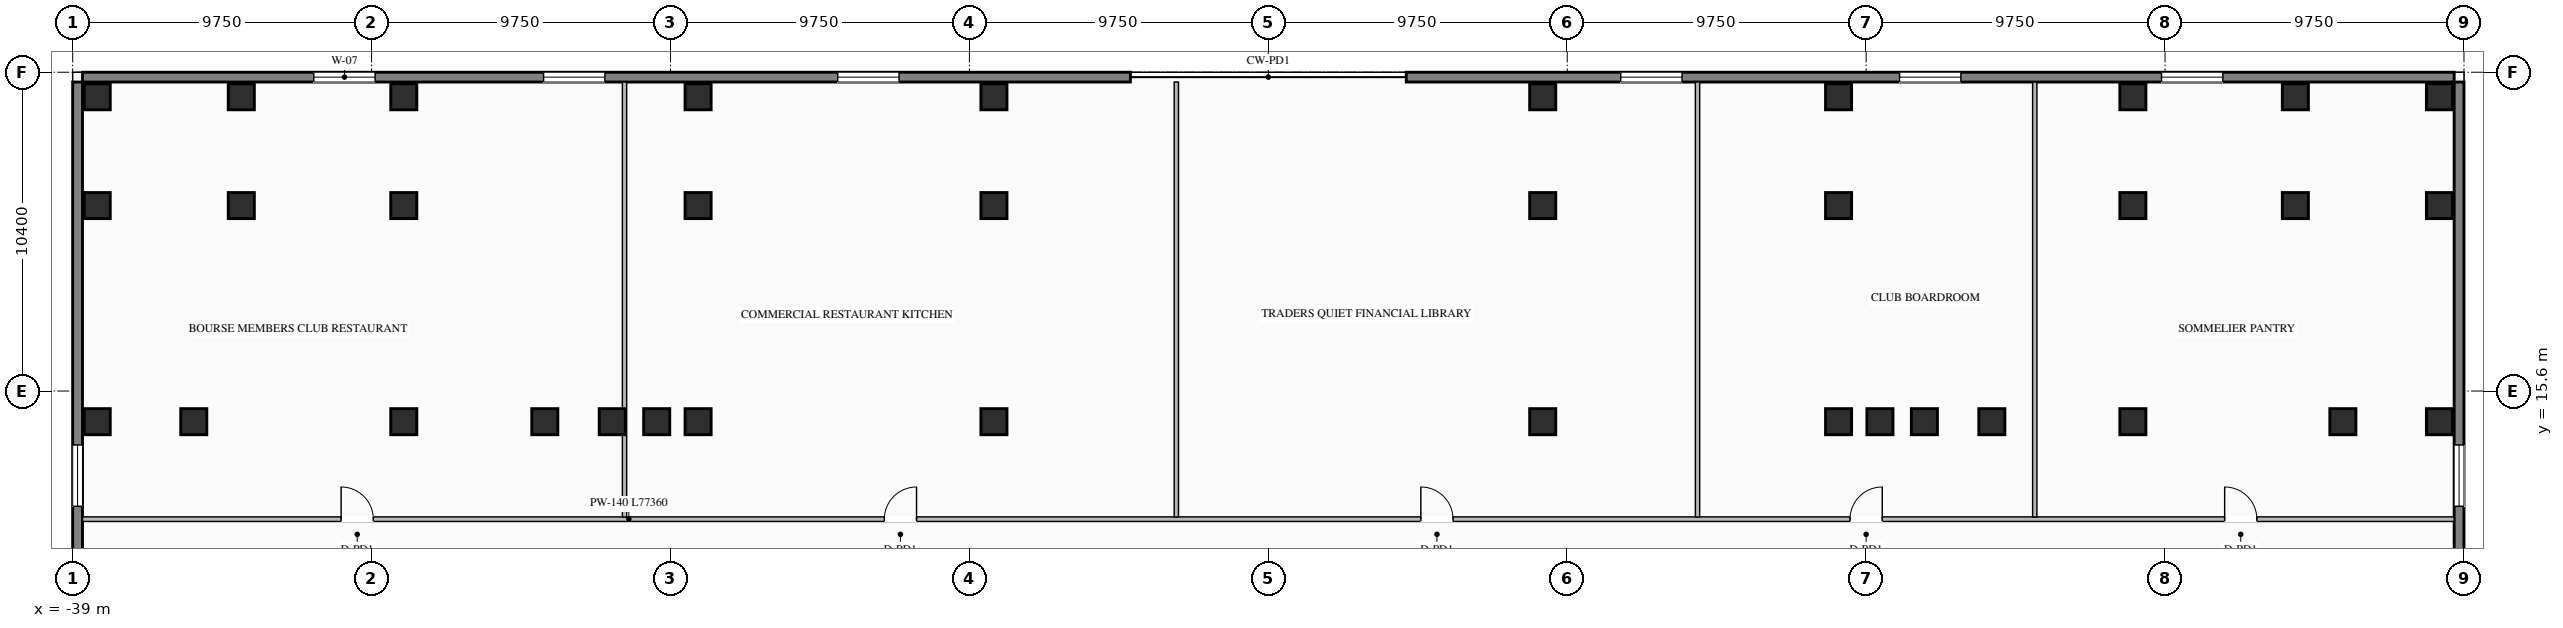
"""IFC4 building model, lengths in metres.
Left out: names, types, materials, properties, quantities, classifications, styles, units other than length and angle.
Written with IfcOpenShell. Run it as: python <this file> out.ifc"""

import sys

from ifc_helpers import new_model, si_unit, direction, frame, frame_2d, origin, origin_2d, place, context, subcontext, project, spatial, rectangle, i_section, extrude, element, fill, save


model = new_model("IFC4")
c1 = context("Model", 3, precision=1e-05, world=origin(), true_north=direction((0.0, 1.0)))
c2 = subcontext(c1, "Body", "Model", "MODEL_VIEW")
j1 = project(units=[si_unit("LENGTHUNIT", "METRE"), si_unit("PLANEANGLEUNIT", "RADIAN")], contexts=[c1])
p1 = place(None, origin())
s1 = spatial("IfcSite", under=j1, at=p1, CompositionType="ELEMENT")
p2 = place(p1, origin())
s2 = spatial("IfcBuilding", under=s1, at=p2, CompositionType="ELEMENT")
p3 = place(p2, frame((0.0, 0.0, 22.8)))
s3 = spatial("IfcBuildingStorey", under=s2, at=p3, CompositionType="ELEMENT", Elevation=22.8)
for number, where, z_axis, x_axis in (
    (1, (-21.4, 14.6, 0.0), (0.0, 0.0, 1.0), (1.0, 0.0, 0.0)),
    (2, (-19.95, 14.6, 0.0), (0.0, 0.0, 1.0), (1.0, 0.0, 0.0)),
    (3, (-18.6, 14.6, 0.0), (0.0, 0.0, 1.0), (1.0, 0.0, 0.0)),
    (4, (-8.95, 14.6, 0.0), (0.0, 0.0, 1.0), (1.0, 0.0, 0.0)),
    (5, (8.95, 14.6, 0.0), (0.0, 0.0, 1.0), (1.0, 0.0, 0.0)),
    (6, (18.6, 14.6, 0.0), (0.0, 0.0, 1.0), (1.0, 0.0, 0.0)),
    (7, (19.95, 14.6, 0.0), (0.0, 0.0, 1.0), (1.0, 0.0, 0.0)),
    (8, (21.4, 14.6, 0.0), (0.0, 0.0, 1.0), (1.0, 0.0, 0.0)),
    (9, (-23.6, 14.6, 0.0), (0.0, 0.0, 1.0), (1.0, 0.0, 0.0)),
    (10, (23.6, 14.6, 0.0), (0.0, 0.0, 1.0), (1.0, 0.0, 0.0)),
    (11, (-28.2, 14.6, 0.0), (0.0, 0.0, 1.0), (1.0, 0.0, 0.0)),
    (12, (28.2, 14.6, 0.0), (0.0, 0.0, 1.0), (1.0, 0.0, 0.0)),
    (13, (-35.05, 14.6, 0.0), (0.0, 0.0, 1.0), (1.0, 0.0, 0.0)),
    (14, (35.05, 14.6, 0.0), (0.0, 0.0, 1.0), (1.0, 0.0, 0.0)),
    (15, (-38.2, 21.65, 0.0), (0.0, 0.0, 1.0), (1.0, 0.0, 0.0)),
    (16, (-33.5, 21.65, 0.0), (0.0, 0.0, 1.0), (1.0, 0.0, 0.0)),
    (17, (-28.2, 21.65, 0.0), (0.0, 0.0, 1.0), (1.0, 0.0, 0.0)),
    (18, (-18.6, 21.65, 0.0), (0.0, 0.0, 1.0), (1.0, 0.0, 0.0)),
    (19, (-8.95, 21.65, 0.0), (0.0, 0.0, 1.0), (1.0, 0.0, 0.0)),
    (20, (8.95, 21.65, 0.0), (0.0, 0.0, 1.0), (1.0, 0.0, 0.0)),
    (21, (18.6, 21.65, 0.0), (0.0, 0.0, 1.0), (1.0, 0.0, 0.0)),
    (22, (28.2, 21.65, 0.0), (0.0, 0.0, 1.0), (1.0, 0.0, 0.0)),
    (23, (33.5, 21.65, 0.0), (0.0, 0.0, 1.0), (1.0, 0.0, 0.0)),
    (24, (38.2, 21.65, 0.0), (0.0, 0.0, 1.0), (1.0, 0.0, 0.0)),
    (25, (-38.2, 25.2, 0.0), (0.0, 0.0, 1.0), (1.0, 0.0, 0.0)),
    (26, (-33.5, 25.2, 0.0), (0.0, 0.0, 1.0), (1.0, 0.0, 0.0)),
    (27, (-28.2, 25.2, 0.0), (0.0, 0.0, 1.0), (1.0, 0.0, 0.0)),
    (28, (-18.6, 25.2, 0.0), (0.0, 0.0, 1.0), (1.0, 0.0, 0.0)),
    (29, (-8.95, 25.2, 0.0), (0.0, 0.0, 1.0), (1.0, 0.0, 0.0)),
    (30, (8.95, 25.2, 0.0), (0.0, 0.0, 1.0), (1.0, 0.0, 0.0)),
    (31, (18.6, 25.2, 0.0), (0.0, 0.0, 1.0), (1.0, 0.0, 0.0)),
    (32, (28.2, 25.2, 0.0), (0.0, 0.0, 1.0), (1.0, 0.0, 0.0)),
    (33, (33.5, 25.2, 0.0), (0.0, 0.0, 1.0), (1.0, 0.0, 0.0)),
    (34, (38.2, 25.2, 0.0), (0.0, 0.0, 1.0), (1.0, 0.0, 0.0)),
    (35, (-38.2, 14.6, 0.0), (0.0, 0.0, 1.0), (1.0, 0.0, 0.0)),
    (36, (38.2, 14.6, 0.0), (0.0, 0.0, 1.0), (1.0, 0.0, 0.0)),
):
    element("IfcColumn", number, at=place(p3, frame(where, z_axis=z_axis, x_axis=x_axis)), inside=s3, PredefinedType="COLUMN", context=c2, shape_type="SweptSolid", body=[
        extrude(i_section(OverallWidth=0.85, OverallDepth=0.85, WebThickness=0.032, FlangeThickness=0.048, at=origin_2d()), origin(), (0.0, 0.0, 1.0), 4.2),
    ])
p4 = place(p3, frame((-38.68, 25.84, 0.0), z_axis=(0.0, 0.0, 1.0), x_axis=(1.0, 0.0, 0.0)))
e37 = element("IfcWall", 37, at=p4, inside=s3, PredefinedType="STANDARD", context=c2, shape_type="SweptSolid", body=[
    extrude(rectangle(XDim=34.18, YDim=0.32, at=frame_2d((17.09, 0.0))), origin(), (0.0, 0.0, 1.0), 3.9),
])
p5 = place(p4, frame((7.545, 0.0, 0.8)))
e38 = element("IfcOpeningElement", 38, at=p5, cuts=e37, PredefinedType="OPENING", context=c2, shape_type="SweptSolid", body=[
    extrude(rectangle(XDim=2.0, YDim=2.2, at=frame_2d((1.0, 1.1))), frame((0.0, 0.17, 0.0), z_axis=(0.0, -1.0, 0.0), x_axis=(1.0, 0.0, 0.0)), (0.0, 0.0, 1.0), 0.34),
])
p6 = place(p4, frame((15.04, 0.0, 0.8)))
e39 = element("IfcOpeningElement", 39, at=p6, cuts=e37, PredefinedType="OPENING", context=c2, shape_type="SweptSolid", body=[
    extrude(rectangle(XDim=2.0, YDim=2.2, at=frame_2d((1.0, 1.1))), frame((0.0, 0.17, 0.0), z_axis=(0.0, -1.0, 0.0), x_axis=(1.0, 0.0, 0.0)), (0.0, 0.0, 1.0), 0.34),
])
p7 = place(p4, frame((24.635, 0.0, 0.8)))
e40 = element("IfcOpeningElement", 40, at=p7, cuts=e37, PredefinedType="OPENING", context=c2, shape_type="SweptSolid", body=[
    extrude(rectangle(XDim=2.0, YDim=2.2, at=frame_2d((1.0, 1.1))), frame((0.0, 0.17, 0.0), z_axis=(0.0, -1.0, 0.0), x_axis=(1.0, 0.0, 0.0)), (0.0, 0.0, 1.0), 0.34),
])
p8 = place(p3, frame((4.5, 25.84, 0.0), z_axis=(0.0, 0.0, 1.0), x_axis=(1.0, 0.0, 0.0)))
e41 = element("IfcWall", 41, at=p8, inside=s3, PredefinedType="STANDARD", context=c2, shape_type="SweptSolid", body=[
    extrude(rectangle(XDim=34.18, YDim=0.32, at=frame_2d((17.09, 0.0))), origin(), (0.0, 0.0, 1.0), 3.9),
])
p9 = place(p8, frame((6.995, 0.0, 0.8)))
e42 = element("IfcOpeningElement", 42, at=p9, cuts=e41, PredefinedType="OPENING", context=c2, shape_type="SweptSolid", body=[
    extrude(rectangle(XDim=2.0, YDim=2.2, at=frame_2d((1.0, 1.1))), frame((0.0, 0.17, 0.0), z_axis=(0.0, -1.0, 0.0), x_axis=(1.0, 0.0, 0.0)), (0.0, 0.0, 1.0), 0.34),
])
p10 = place(p8, frame((16.09, 0.0, 0.8)))
e43 = element("IfcOpeningElement", 43, at=p10, cuts=e41, PredefinedType="OPENING", context=c2, shape_type="SweptSolid", body=[
    extrude(rectangle(XDim=2.0, YDim=2.2, at=frame_2d((1.0, 1.1))), frame((0.0, 0.17, 0.0), z_axis=(0.0, -1.0, 0.0), x_axis=(1.0, 0.0, 0.0)), (0.0, 0.0, 1.0), 0.34),
])
p11 = place(p8, frame((24.635, 0.0, 0.8)))
e44 = element("IfcOpeningElement", 44, at=p11, cuts=e41, PredefinedType="OPENING", context=c2, shape_type="SweptSolid", body=[
    extrude(rectangle(XDim=2.0, YDim=2.2, at=frame_2d((1.0, 1.1))), frame((0.0, 0.17, 0.0), z_axis=(0.0, -1.0, 0.0), x_axis=(1.0, 0.0, 0.0)), (0.0, 0.0, 1.0), 0.34),
])
p12 = place(p3, frame((-38.84, -25.68, 0.0), z_axis=(0.0, 0.0, 1.0), x_axis=(0.0, 1.0, 0.0)))
e45 = element("IfcWall", 45, at=p12, inside=s3, PredefinedType="STANDARD", context=c2, shape_type="SweptSolid", body=[
    extrude(rectangle(XDim=51.36, YDim=0.32, at=frame_2d((25.68, 0.0))), origin(), (0.0, 0.0, 1.0), 3.9),
])
p13 = place(p12, frame((11.84, 0.0, 0.8)))
e46 = element("IfcOpeningElement", 46, at=p13, cuts=e45, PredefinedType="OPENING", context=c2, shape_type="SweptSolid", body=[
    extrude(rectangle(XDim=2.0, YDim=2.2, at=frame_2d((1.0, 1.1))), frame((0.0, 0.17, 0.0), z_axis=(0.0, -1.0, 0.0), x_axis=(1.0, 0.0, 0.0)), (0.0, 0.0, 1.0), 0.34),
])
p14 = place(p12, frame((24.68, 0.0, 0.8)))
e47 = element("IfcOpeningElement", 47, at=p14, cuts=e45, PredefinedType="OPENING", context=c2, shape_type="SweptSolid", body=[
    extrude(rectangle(XDim=2.0, YDim=2.2, at=frame_2d((1.0, 1.1))), frame((0.0, 0.17, 0.0), z_axis=(0.0, -1.0, 0.0), x_axis=(1.0, 0.0, 0.0)), (0.0, 0.0, 1.0), 0.34),
])
p15 = place(p12, frame((37.52, 0.0, 0.8)))
e48 = element("IfcOpeningElement", 48, at=p15, cuts=e45, PredefinedType="OPENING", context=c2, shape_type="SweptSolid", body=[
    extrude(rectangle(XDim=2.0, YDim=2.2, at=frame_2d((1.0, 1.1))), frame((0.0, 0.17, 0.0), z_axis=(0.0, -1.0, 0.0), x_axis=(1.0, 0.0, 0.0)), (0.0, 0.0, 1.0), 0.34),
])
p16 = place(p3, frame((38.84, 25.68, 0.0), z_axis=(0.0, 0.0, 1.0), x_axis=(0.0, -1.0, 0.0)))
e49 = element("IfcWall", 49, at=p16, inside=s3, PredefinedType="STANDARD", context=c2, shape_type="SweptSolid", body=[
    extrude(rectangle(XDim=51.36, YDim=0.32, at=frame_2d((25.68, 0.0))), origin(), (0.0, 0.0, 1.0), 3.9),
])
p17 = place(p16, frame((11.84, 0.0, 0.8)))
e50 = element("IfcOpeningElement", 50, at=p17, cuts=e49, PredefinedType="OPENING", context=c2, shape_type="SweptSolid", body=[
    extrude(rectangle(XDim=2.0, YDim=2.2, at=frame_2d((1.0, 1.1))), frame((0.0, 0.17, 0.0), z_axis=(0.0, -1.0, 0.0), x_axis=(1.0, 0.0, 0.0)), (0.0, 0.0, 1.0), 0.34),
])
p18 = place(p16, frame((24.68, 0.0, 0.8)))
e51 = element("IfcOpeningElement", 51, at=p18, cuts=e49, PredefinedType="OPENING", context=c2, shape_type="SweptSolid", body=[
    extrude(rectangle(XDim=2.0, YDim=2.2, at=frame_2d((1.0, 1.1))), frame((0.0, 0.17, 0.0), z_axis=(0.0, -1.0, 0.0), x_axis=(1.0, 0.0, 0.0)), (0.0, 0.0, 1.0), 0.34),
])
p19 = place(p16, frame((37.52, 0.0, 0.8)))
e52 = element("IfcOpeningElement", 52, at=p19, cuts=e49, PredefinedType="OPENING", context=c2, shape_type="SweptSolid", body=[
    extrude(rectangle(XDim=2.0, YDim=2.2, at=frame_2d((1.0, 1.1))), frame((0.0, 0.17, 0.0), z_axis=(0.0, -1.0, 0.0), x_axis=(1.0, 0.0, 0.0)), (0.0, 0.0, 1.0), 0.34),
])
p20 = place(p3, frame((-38.68, 11.42, 0.0), z_axis=(0.0, 0.0, 1.0), x_axis=(1.0, 0.0, 0.0)))
e53 = element("IfcWall", 53, at=p20, inside=s3, PredefinedType="STANDARD", context=c2, shape_type="SweptSolid", body=[
    extrude(rectangle(XDim=77.36, YDim=0.15, at=frame_2d((38.68, 0.0))), origin(), (0.0, 0.0, 1.0), 3.395),
])
p21 = place(p20, frame((8.436, 0.0, 0.0)))
e54 = element("IfcOpeningElement", 54, at=p21, cuts=e53, PredefinedType="OPENING", context=c2, shape_type="SweptSolid", body=[
    extrude(rectangle(XDim=1.05, YDim=2.08, at=frame_2d((0.525, 1.04))), frame((0.0, 0.085, 0.0), z_axis=(0.0, -1.0, 0.0), x_axis=(1.0, 0.0, 0.0)), (0.0, 0.0, 1.0), 0.17),
])
p22 = place(p20, frame((26.155, 0.0, 0.0)))
e55 = element("IfcOpeningElement", 55, at=p22, cuts=e53, PredefinedType="OPENING", context=c2, shape_type="SweptSolid", body=[
    extrude(rectangle(XDim=1.05, YDim=2.08, at=frame_2d((0.525, 1.04))), frame((0.0, 0.085, 0.0), z_axis=(0.0, -1.0, 0.0), x_axis=(1.0, 0.0, 0.0)), (0.0, 0.0, 1.0), 0.17),
])
p23 = place(p20, frame((43.655, 0.0, 0.0)))
e56 = element("IfcOpeningElement", 56, at=p23, cuts=e53, PredefinedType="OPENING", context=c2, shape_type="SweptSolid", body=[
    extrude(rectangle(XDim=1.05, YDim=2.08, at=frame_2d((0.525, 1.04))), frame((0.0, 0.085, 0.0), z_axis=(0.0, -1.0, 0.0), x_axis=(1.0, 0.0, 0.0)), (0.0, 0.0, 1.0), 0.17),
])
p24 = place(p20, frame((57.655, 0.0, 0.0)))
e57 = element("IfcOpeningElement", 57, at=p24, cuts=e53, PredefinedType="OPENING", context=c2, shape_type="SweptSolid", body=[
    extrude(rectangle(XDim=1.05, YDim=2.08, at=frame_2d((0.525, 1.04))), frame((0.0, 0.085, 0.0), z_axis=(0.0, -1.0, 0.0), x_axis=(1.0, 0.0, 0.0)), (0.0, 0.0, 1.0), 0.17),
])
p25 = place(p20, frame((69.874, 0.0, 0.0)))
e58 = element("IfcOpeningElement", 58, at=p25, cuts=e53, PredefinedType="OPENING", context=c2, shape_type="SweptSolid", body=[
    extrude(rectangle(XDim=1.05, YDim=2.08, at=frame_2d((0.525, 1.04))), frame((0.0, 0.085, 0.0), z_axis=(0.0, -1.0, 0.0), x_axis=(1.0, 0.0, 0.0)), (0.0, 0.0, 1.0), 0.17),
])
for number, where, z_axis, x_axis in (
    (59, (-21.0, 11.49, 0.0), (0.0, 0.0, 1.0), (0.0, 1.0, 0.0)),
    (60, (-3.0, 11.49, 0.0), (0.0, 0.0, 1.0), (0.0, 1.0, 0.0)),
    (61, (14.0, 11.49, 0.0), (0.0, 0.0, 1.0), (0.0, 1.0, 0.0)),
    (62, (25.0, 11.49, 0.0), (0.0, 0.0, 1.0), (0.0, 1.0, 0.0)),
):
    element("IfcWall", number, at=place(p3, frame(where, z_axis=z_axis, x_axis=x_axis)), inside=s3, PredefinedType="STANDARD", context=c2, shape_type="SweptSolid", body=[
        extrude(rectangle(XDim=14.19, YDim=0.14, at=frame_2d((7.095, 0.0))), origin(), (0.0, 0.0, 1.0), 3.9),
    ])
p26 = place(p5, origin())
e63 = element("IfcWindow", 63, at=p26, inside=s3, PartitioningType="DOUBLE_PANEL_VERTICAL", PredefinedType="WINDOW", context=c2, shape_type="SweptSolid", body=[
    extrude(rectangle(XDim=2.0, YDim=2.2, at=frame_2d((1.0, 1.1))), frame((0.0, 0.03, 0.0), z_axis=(0.0, -1.0, 0.0), x_axis=(1.0, 0.0, 0.0)), (0.0, 0.0, 1.0), 0.06),
])
fill(e38, e63)
p27 = place(p6, origin())
e64 = element("IfcWindow", 64, at=p27, inside=s3, PartitioningType="DOUBLE_PANEL_VERTICAL", PredefinedType="WINDOW", context=c2, shape_type="SweptSolid", body=[
    extrude(rectangle(XDim=2.0, YDim=2.2, at=frame_2d((1.0, 1.1))), frame((0.0, 0.03, 0.0), z_axis=(0.0, -1.0, 0.0), x_axis=(1.0, 0.0, 0.0)), (0.0, 0.0, 1.0), 0.06),
])
fill(e39, e64)
p28 = place(p7, origin())
e65 = element("IfcWindow", 65, at=p28, inside=s3, PartitioningType="DOUBLE_PANEL_VERTICAL", PredefinedType="WINDOW", context=c2, shape_type="SweptSolid", body=[
    extrude(rectangle(XDim=2.0, YDim=2.2, at=frame_2d((1.0, 1.1))), frame((0.0, 0.03, 0.0), z_axis=(0.0, -1.0, 0.0), x_axis=(1.0, 0.0, 0.0)), (0.0, 0.0, 1.0), 0.06),
])
fill(e40, e65)
p29 = place(p9, origin())
e66 = element("IfcWindow", 66, at=p29, inside=s3, PartitioningType="DOUBLE_PANEL_VERTICAL", PredefinedType="WINDOW", context=c2, shape_type="SweptSolid", body=[
    extrude(rectangle(XDim=2.0, YDim=2.2, at=frame_2d((1.0, 1.1))), frame((0.0, 0.03, 0.0), z_axis=(0.0, -1.0, 0.0), x_axis=(1.0, 0.0, 0.0)), (0.0, 0.0, 1.0), 0.06),
])
fill(e42, e66)
p30 = place(p10, origin())
e67 = element("IfcWindow", 67, at=p30, inside=s3, PartitioningType="DOUBLE_PANEL_VERTICAL", PredefinedType="WINDOW", context=c2, shape_type="SweptSolid", body=[
    extrude(rectangle(XDim=2.0, YDim=2.2, at=frame_2d((1.0, 1.1))), frame((0.0, 0.03, 0.0), z_axis=(0.0, -1.0, 0.0), x_axis=(1.0, 0.0, 0.0)), (0.0, 0.0, 1.0), 0.06),
])
fill(e43, e67)
p31 = place(p11, origin())
e68 = element("IfcWindow", 68, at=p31, inside=s3, PartitioningType="DOUBLE_PANEL_VERTICAL", PredefinedType="WINDOW", context=c2, shape_type="SweptSolid", body=[
    extrude(rectangle(XDim=2.0, YDim=2.2, at=frame_2d((1.0, 1.1))), frame((0.0, 0.03, 0.0), z_axis=(0.0, -1.0, 0.0), x_axis=(1.0, 0.0, 0.0)), (0.0, 0.0, 1.0), 0.06),
])
fill(e44, e68)
p32 = place(p15, origin())
e69 = element("IfcWindow", 69, at=p32, inside=s3, PartitioningType="DOUBLE_PANEL_VERTICAL", PredefinedType="WINDOW", context=c2, shape_type="SweptSolid", body=[
    extrude(rectangle(XDim=2.0, YDim=2.2, at=frame_2d((1.0, 1.1))), frame((0.0, 0.03, 0.0), z_axis=(0.0, -1.0, 0.0), x_axis=(1.0, 0.0, 0.0)), (0.0, 0.0, 1.0), 0.06),
])
fill(e48, e69)
p33 = place(p17, origin())
e70 = element("IfcWindow", 70, at=p33, inside=s3, PartitioningType="DOUBLE_PANEL_VERTICAL", PredefinedType="WINDOW", context=c2, shape_type="SweptSolid", body=[
    extrude(rectangle(XDim=2.0, YDim=2.2, at=frame_2d((1.0, 1.1))), frame((0.0, 0.03, 0.0), z_axis=(0.0, -1.0, 0.0), x_axis=(1.0, 0.0, 0.0)), (0.0, 0.0, 1.0), 0.06),
])
fill(e50, e70)
p34 = place(p21, origin())
e71 = element("IfcDoor", 71, at=p34, inside=s3, OperationType="SINGLE_SWING_LEFT", PredefinedType="DOOR", context=c2, shape_type="SweptSolid", body=[
    extrude(rectangle(XDim=1.05, YDim=2.08, at=frame_2d((0.525, 1.04))), frame((0.0, 0.025, 0.0), z_axis=(0.0, -1.0, 0.0), x_axis=(1.0, 0.0, 0.0)), (0.0, 0.0, 1.0), 0.05),
])
fill(e54, e71)
p35 = place(p22, origin())
e72 = element("IfcDoor", 72, at=p35, inside=s3, OperationType="SINGLE_SWING_RIGHT", PredefinedType="DOOR", context=c2, shape_type="SweptSolid", body=[
    extrude(rectangle(XDim=1.05, YDim=2.08, at=frame_2d((0.525, 1.04))), frame((0.0, 0.025, 0.0), z_axis=(0.0, -1.0, 0.0), x_axis=(1.0, 0.0, 0.0)), (0.0, 0.0, 1.0), 0.05),
])
fill(e55, e72)
p36 = place(p23, origin())
e73 = element("IfcDoor", 73, at=p36, inside=s3, OperationType="SINGLE_SWING_LEFT", PredefinedType="DOOR", context=c2, shape_type="SweptSolid", body=[
    extrude(rectangle(XDim=1.05, YDim=2.08, at=frame_2d((0.525, 1.04))), frame((0.0, 0.025, 0.0), z_axis=(0.0, -1.0, 0.0), x_axis=(1.0, 0.0, 0.0)), (0.0, 0.0, 1.0), 0.05),
])
fill(e56, e73)
p37 = place(p24, origin())
e74 = element("IfcDoor", 74, at=p37, inside=s3, OperationType="SINGLE_SWING_RIGHT", PredefinedType="DOOR", context=c2, shape_type="SweptSolid", body=[
    extrude(rectangle(XDim=1.05, YDim=2.08, at=frame_2d((0.525, 1.04))), frame((0.0, 0.025, 0.0), z_axis=(0.0, -1.0, 0.0), x_axis=(1.0, 0.0, 0.0)), (0.0, 0.0, 1.0), 0.05),
])
fill(e57, e74)
p38 = place(p25, origin())
e75 = element("IfcDoor", 75, at=p38, inside=s3, OperationType="SINGLE_SWING_LEFT", PredefinedType="DOOR", context=c2, shape_type="SweptSolid", body=[
    extrude(rectangle(XDim=1.05, YDim=2.08, at=frame_2d((0.525, 1.04))), frame((0.0, 0.025, 0.0), z_axis=(0.0, -1.0, 0.0), x_axis=(1.0, 0.0, 0.0)), (0.0, 0.0, 1.0), 0.05),
])
fill(e58, e75)
save(model, sys.argv[1])
